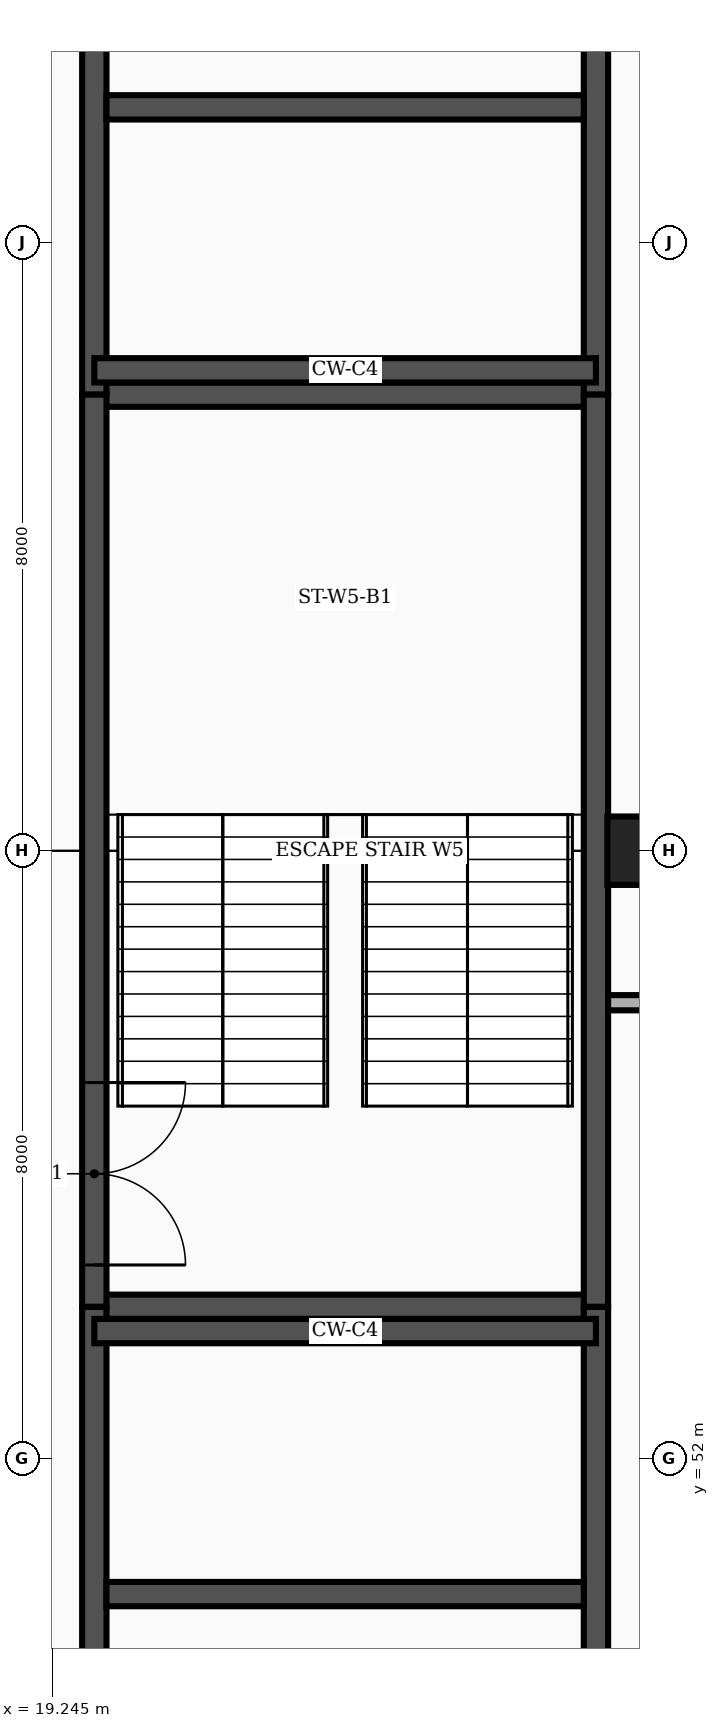
"""IFC4 building model, lengths in metres.
Left out: names, types, materials, properties, quantities, classifications, styles, units other than length and angle.
Written with IfcOpenShell. Run it as: python <this file> out.ifc"""

import sys

from ifc_helpers import new_model, si_unit, direction, frame, frame_2d, origin, origin_2d, place, context, subcontext, project, spatial, rectangle, extrude, element, fill, save


model = new_model("IFC4")
c1 = context("Model", 3, precision=1e-05, world=origin(), true_north=direction((0.0, 1.0)))
c2 = subcontext(c1, "Body", "Model", "MODEL_VIEW")
j1 = project(units=[si_unit("LENGTHUNIT", "METRE"), si_unit("PLANEANGLEUNIT", "RADIAN")], contexts=[c1])
p1 = place(None, origin())
s1 = spatial("IfcSite", under=j1, at=p1, CompositionType="ELEMENT")
p2 = place(p1, origin())
s2 = spatial("IfcBuilding", under=s1, at=p2, CompositionType="ELEMENT")
p3 = place(p2, frame((0.0, 0.0, -4.5)))
s3 = spatial("IfcBuildingStorey", under=s2, at=p3, CompositionType="ELEMENT", Elevation=-4.5)
p4 = place(p3, frame((27.0, 60.0, -0.45), z_axis=(0.0, 0.0, 1.0), x_axis=(1.0, 0.0, 0.0)))
e1 = element("IfcColumn", 1, at=p4, inside=s3, PredefinedType="COLUMN", context=c2, shape_type="SweptSolid", body=[
    extrude(rectangle(XDim=0.9, YDim=0.9, at=origin_2d()), origin(), (0.0, 0.0, 1.0), 4.95),
])
p5 = place(p3, frame((19.8, 54.0, 0.0), z_axis=(0.0, 0.0, 1.0), x_axis=(1.0, 0.0, 0.0)))
e2 = element("IfcWall", 2, at=p5, inside=s3, PredefinedType="SHEAR", context=c2, shape_type="SweptSolid", body=[
    extrude(rectangle(XDim=6.6, YDim=0.32, at=frame_2d((3.3, 0.0))), origin(), (0.0, 0.0, 1.0), 4.24),
])
p6 = place(p3, frame((19.8, 39.4, 0.0), z_axis=(0.0, 0.0, 1.0), x_axis=(0.0, 1.0, 0.0)))
e3 = element("IfcWall", 3, at=p6, inside=s3, PredefinedType="SHEAR", context=c2, shape_type="SweptSolid", body=[
    extrude(rectangle(XDim=14.6, YDim=0.32, at=frame_2d((7.3, 0.0))), origin(), (0.0, 0.0, 1.0), 4.24),
])
p7 = place(p6, frame((0.55, 0.0, 0.0)))
e4 = element("IfcOpeningElement", 4, at=p7, cuts=e3, PredefinedType="OPENING", context=c2, shape_type="SweptSolid", body=[
    extrude(rectangle(XDim=2.4, YDim=2.25, at=frame_2d((1.2, 1.125))), frame((0.0, 0.172, 0.0), z_axis=(0.0, -1.0, 0.0), x_axis=(1.0, 0.0, 0.0)), (0.0, 0.0, 1.0), 0.344),
])
p8 = place(p3, frame((26.4, 39.4, 0.0), z_axis=(0.0, 0.0, 1.0), x_axis=(0.0, 1.0, 0.0)))
e5 = element("IfcWall", 5, at=p8, inside=s3, PredefinedType="SHEAR", context=c2, shape_type="SweptSolid", body=[
    extrude(rectangle(XDim=14.6, YDim=0.32, at=frame_2d((7.3, 0.0))), origin(), (0.0, 0.0, 1.0), 4.24),
])
p9 = place(p3, frame((19.96, 50.22, 0.0), z_axis=(0.0, 0.0, 1.0), x_axis=(1.0, 0.0, 0.0)))
e6 = element("IfcWall", 6, at=p9, inside=s3, PredefinedType="SHEAR", context=c2, shape_type="SweptSolid", body=[
    extrude(rectangle(XDim=6.28, YDim=0.32, at=frame_2d((3.14, 0.0))), origin(), (0.0, 0.0, 1.0), 4.24),
])
p10 = place(p3, frame((19.8, 66.0, 0.0), z_axis=(0.0, 0.0, 1.0), x_axis=(1.0, 0.0, 0.0)))
e7 = element("IfcWall", 7, at=p10, inside=s3, PredefinedType="SHEAR", context=c2, shape_type="SweptSolid", body=[
    extrude(rectangle(XDim=6.6, YDim=0.32, at=frame_2d((3.3, 0.0))), origin(), (0.0, 0.0, 1.0), 4.24),
])
p11 = place(p3, frame((19.8, 66.0, 0.0), z_axis=(0.0, 0.0, 1.0), x_axis=(0.0, 1.0, 0.0)))
e8 = element("IfcWall", 8, at=p11, inside=s3, PredefinedType="SHEAR", context=c2, shape_type="SweptSolid", body=[
    extrude(rectangle(XDim=14.6, YDim=0.32, at=frame_2d((7.3, 0.0))), origin(), (0.0, 0.0, 1.0), 4.24),
])
p12 = place(p11, frame((11.65, 0.0, 0.0)))
e9 = element("IfcOpeningElement", 9, at=p12, cuts=e8, PredefinedType="OPENING", context=c2, shape_type="SweptSolid", body=[
    extrude(rectangle(XDim=2.4, YDim=2.25, at=frame_2d((1.2, 1.125))), frame((0.0, 0.172, 0.0), z_axis=(0.0, -1.0, 0.0), x_axis=(1.0, 0.0, 0.0)), (0.0, 0.0, 1.0), 0.344),
])
p13 = place(p3, frame((26.4, 66.0, 0.0), z_axis=(0.0, 0.0, 1.0), x_axis=(0.0, 1.0, 0.0)))
e10 = element("IfcWall", 10, at=p13, inside=s3, PredefinedType="SHEAR", context=c2, shape_type="SweptSolid", body=[
    extrude(rectangle(XDim=14.6, YDim=0.32, at=frame_2d((7.3, 0.0))), origin(), (0.0, 0.0, 1.0), 4.24),
])
p14 = place(p3, frame((19.96, 69.78, 0.0), z_axis=(0.0, 0.0, 1.0), x_axis=(1.0, 0.0, 0.0)))
e11 = element("IfcWall", 11, at=p14, inside=s3, PredefinedType="SHEAR", context=c2, shape_type="SweptSolid", body=[
    extrude(rectangle(XDim=6.28, YDim=0.32, at=frame_2d((3.14, 0.0))), origin(), (0.0, 0.0, 1.0), 4.24),
])
for number, where, z_axis, x_axis in (
    (12, (19.8, 53.68, 0.0), (0.0, 0.0, 1.0), (1.0, 0.0, 0.0)),
    (13, (19.8, 66.32, 0.0), (0.0, 0.0, 1.0), (1.0, 0.0, 0.0)),
):
    element("IfcWall", number, at=place(p3, frame(where, z_axis=z_axis, x_axis=x_axis)), inside=s3, PredefinedType="SHEAR", context=c2, shape_type="SweptSolid", body=[
        extrude(rectangle(XDim=6.6, YDim=0.32, at=frame_2d((3.3, 0.0))), origin(), (0.0, 0.0, 1.0), 4.24),
    ])
p15 = place(p3, frame((19.8, 54.0, 0.0), z_axis=(0.0, 0.0, 1.0), x_axis=(0.0, 1.0, 0.0)))
e14 = element("IfcWall", 14, at=p15, inside=s3, PredefinedType="SHEAR", context=c2, shape_type="SweptSolid", body=[
    extrude(rectangle(XDim=12.0, YDim=0.32, at=frame_2d((6.0, 0.0))), origin(), (0.0, 0.0, 1.0), 4.24),
])
p16 = place(p15, frame((0.55, 0.0, 0.0)))
e15 = element("IfcOpeningElement", 15, at=p16, cuts=e14, PredefinedType="OPENING", context=c2, shape_type="SweptSolid", body=[
    extrude(rectangle(XDim=2.4, YDim=2.25, at=frame_2d((1.2, 1.125))), frame((0.0, 0.172, 0.0), z_axis=(0.0, -1.0, 0.0), x_axis=(1.0, 0.0, 0.0)), (0.0, 0.0, 1.0), 0.344),
])
p17 = place(p3, frame((26.4, 54.0, 0.0), z_axis=(0.0, 0.0, 1.0), x_axis=(0.0, 1.0, 0.0)))
e16 = element("IfcWall", 16, at=p17, inside=s3, PredefinedType="SHEAR", context=c2, shape_type="SweptSolid", body=[
    extrude(rectangle(XDim=12.0, YDim=0.32, at=frame_2d((6.0, 0.0))), origin(), (0.0, 0.0, 1.0), 4.24),
])
p18 = place(p3, frame((26.56, 58.0, 0.0), z_axis=(0.0, 0.0, 1.0), x_axis=(1.0, 0.0, 0.0)))
e17 = element("IfcWall", 17, at=p18, inside=s3, PredefinedType="PARTITIONING", context=c2, shape_type="SweptSolid", body=[
    extrude(rectangle(XDim=18.355, YDim=0.2, at=frame_2d((9.177, 0.0))), origin(), (0.0, 0.0, 1.0), 4.24),
])
p19 = place(p16, frame((2.4, 0.0, 0.0), z_axis=(0.0, 0.0, 1.0), x_axis=(-1.0, 0.0, 0.0)))
e18 = element("IfcDoor", 18, at=p19, inside=s3, OperationType="DOUBLE_DOOR_SINGLE_SWING", PredefinedType="DOOR", context=c2, shape_type="SweptSolid", body=[
    extrude(rectangle(XDim=2.4, YDim=2.25, at=frame_2d((1.2, 1.125))), frame((0.0, 0.025, 0.0), z_axis=(0.0, -1.0, 0.0), x_axis=(1.0, 0.0, 0.0)), (0.0, 0.0, 1.0), 0.05),
])
fill(e15, e18)
save(model, sys.argv[1])
